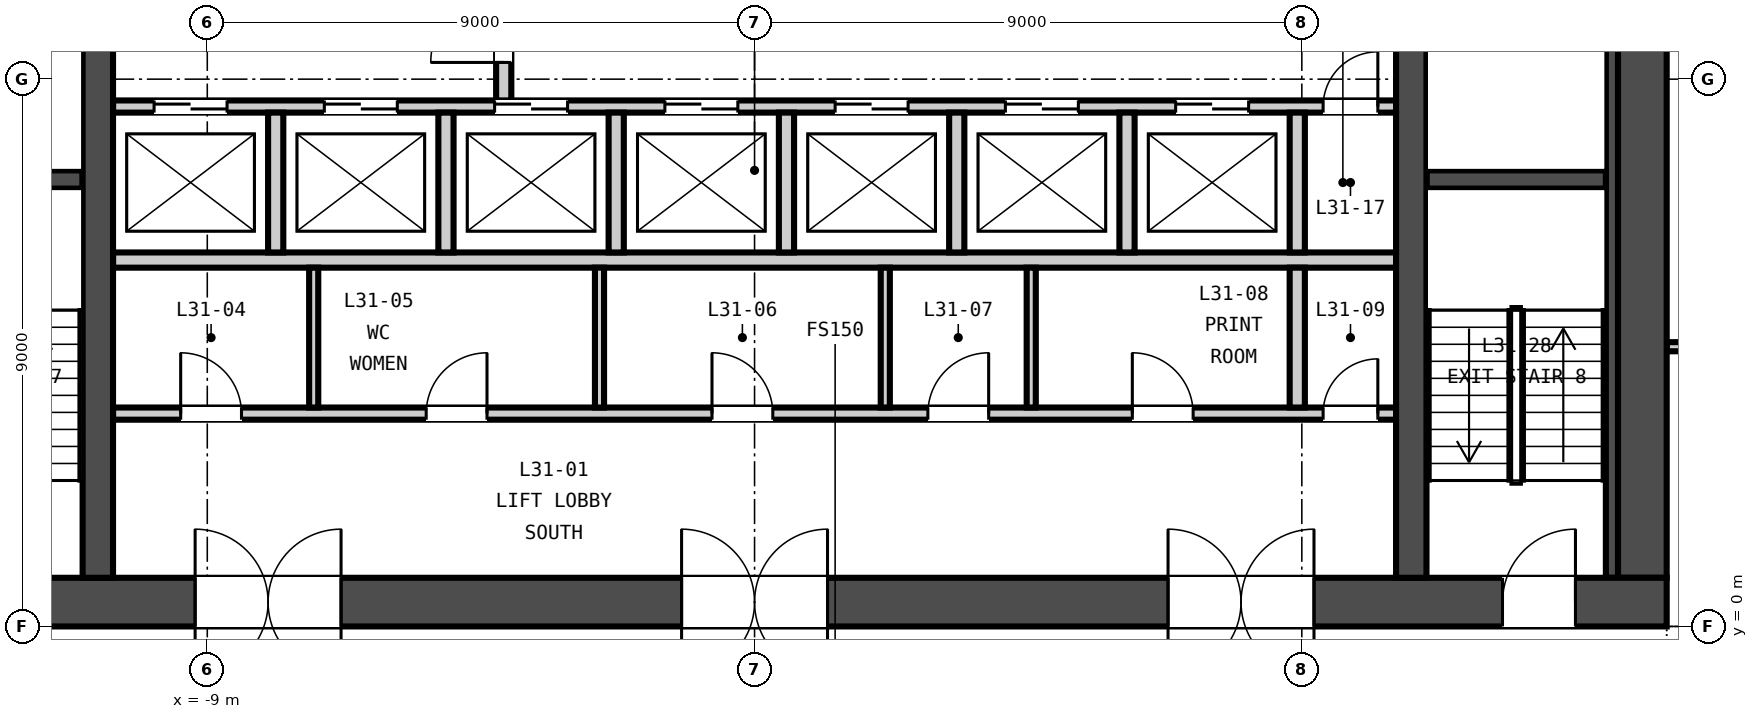
"""IFC4 building model, lengths in metres.
Left out: names, types, materials, properties, quantities, classifications, styles, units other than length and angle.
Written with IfcOpenShell. Run it as: python <this file> out.ifc"""

import sys

from ifc_helpers import new_model, si_unit, direction, frame, frame_2d, origin, place, context, subcontext, project, spatial, rectangle, extrude, element, fill, save


model = new_model("IFC4")
c1 = context("Model", 3, precision=1e-05, world=origin(), true_north=direction((0.0, 1.0)))
c2 = subcontext(c1, "Body", "Model", "MODEL_VIEW")
j1 = project(units=[si_unit("LENGTHUNIT", "METRE"), si_unit("PLANEANGLEUNIT", "RADIAN")], contexts=[c1])
p1 = place(None, origin())
s1 = spatial("IfcSite", under=j1, at=p1, CompositionType="ELEMENT")
p2 = place(p1, origin())
s2 = spatial("IfcBuilding", under=s1, at=p2, CompositionType="ELEMENT")
p3 = place(p2, frame((0.0, 0.0, 129.8)))
s3 = spatial("IfcBuildingStorey", under=s2, at=p3, CompositionType="ELEMENT", Elevation=129.8)
p4 = place(p3, frame((-15.0, 0.4, -0.15), z_axis=(0.0, 0.0, 1.0), x_axis=(1.0, 0.0, 0.0)))
e1 = element("IfcWall", 1, at=p4, inside=s3, PredefinedType="SOLIDWALL", context=c2, shape_type="SweptSolid", body=[
    extrude(rectangle(XDim=30.0, YDim=0.8, at=frame_2d((15.0, 0.0))), origin(), (0.0, 0.0, 1.0), 3.65),
])
p5 = place(p4, frame((5.8, 0.0, 0.15)))
e2 = element("IfcOpeningElement", 2, at=p5, cuts=e1, PredefinedType="OPENING", context=c2, shape_type="SweptSolid", body=[
    extrude(rectangle(XDim=2.4, YDim=2.4, at=frame_2d((1.2, 1.2))), frame((0.0, 0.41, 0.0), z_axis=(0.0, -1.0, 0.0), x_axis=(1.0, 0.0, 0.0)), (0.0, 0.0, 1.0), 0.82),
])
p6 = place(p4, frame((13.8, 0.0, 0.15)))
e3 = element("IfcOpeningElement", 3, at=p6, cuts=e1, PredefinedType="OPENING", context=c2, shape_type="SweptSolid", body=[
    extrude(rectangle(XDim=2.4, YDim=2.4, at=frame_2d((1.2, 1.2))), frame((0.0, 0.41, 0.0), z_axis=(0.0, -1.0, 0.0), x_axis=(1.0, 0.0, 0.0)), (0.0, 0.0, 1.0), 0.82),
])
p7 = place(p4, frame((21.8, 0.0, 0.15)))
e4 = element("IfcOpeningElement", 4, at=p7, cuts=e1, PredefinedType="OPENING", context=c2, shape_type="SweptSolid", body=[
    extrude(rectangle(XDim=2.4, YDim=2.4, at=frame_2d((1.2, 1.2))), frame((0.0, 0.41, 0.0), z_axis=(0.0, -1.0, 0.0), x_axis=(1.0, 0.0, 0.0)), (0.0, 0.0, 1.0), 0.82),
])
p8 = place(p4, frame((1.5, 0.0, 0.15)))
e5 = element("IfcOpeningElement", 5, at=p8, cuts=e1, PredefinedType="OPENING", context=c2, shape_type="SweptSolid", body=[
    extrude(rectangle(XDim=1.2, YDim=2.1, at=frame_2d((0.6, 1.05))), frame((0.0, 0.41, 0.0), z_axis=(0.0, -1.0, 0.0), x_axis=(1.0, 0.0, 0.0)), (0.0, 0.0, 1.0), 0.82),
])
p9 = place(p4, frame((27.3, 0.0, 0.15)))
e6 = element("IfcOpeningElement", 6, at=p9, cuts=e1, PredefinedType="OPENING", context=c2, shape_type="SweptSolid", body=[
    extrude(rectangle(XDim=1.2, YDim=2.1, at=frame_2d((0.6, 1.05))), frame((0.0, 0.41, 0.0), z_axis=(0.0, -1.0, 0.0), x_axis=(1.0, 0.0, 0.0)), (0.0, 0.0, 1.0), 0.82),
])
p10 = place(p3, frame((14.6, 0.8, -0.15), z_axis=(0.0, 0.0, 1.0), x_axis=(0.0, 1.0, 0.0)))
e7 = element("IfcWall", 7, at=p10, inside=s3, PredefinedType="SOLIDWALL", context=c2, shape_type="SweptSolid", body=[
    extrude(rectangle(XDim=13.4, YDim=0.8, at=frame_2d((6.7, 0.0))), origin(), (0.0, 0.0, 1.0), 3.65),
])
for number, where, z_axis, x_axis in (
    (8, (-10.8, 0.8, -0.15), (0.0, 0.0, 1.0), (0.0, 1.0, 0.0)),
    (9, (10.8, 0.8, -0.15), (0.0, 0.0, 1.0), (0.0, 1.0, 0.0)),
):
    element("IfcWall", number, at=place(p3, frame(where, z_axis=z_axis, x_axis=x_axis)), inside=s3, PredefinedType="SOLIDWALL", context=c2, shape_type="SweptSolid", body=[
        extrude(rectangle(XDim=13.4, YDim=0.5, at=frame_2d((6.7, 0.0))), origin(), (0.0, 0.0, 1.0), 3.65),
    ])
p11 = place(p3, frame((-10.55, 3.5, 0.0), z_axis=(0.0, 0.0, 1.0), x_axis=(1.0, 0.0, 0.0)))
e10 = element("IfcWall", 10, at=p11, inside=s3, PredefinedType="PARTITIONING", context=c2, shape_type="SweptSolid", body=[
    extrude(rectangle(XDim=21.1, YDim=0.2, at=frame_2d((10.55, 0.0))), origin(), (0.0, 0.0, 1.0), 3.5),
])
p12 = place(p11, frame((1.113, 0.0, 0.0)))
e11 = element("IfcOpeningElement", 11, at=p12, cuts=e10, PredefinedType="OPENING", context=c2, shape_type="SweptSolid", body=[
    extrude(rectangle(XDim=1.0, YDim=2.1, at=frame_2d((0.5, 1.05))), frame((0.0, 0.11, 0.0), z_axis=(0.0, -1.0, 0.0), x_axis=(1.0, 0.0, 0.0)), (0.0, 0.0, 1.0), 0.22),
])
p13 = place(p11, frame((5.15, 0.0, 0.0)))
e12 = element("IfcOpeningElement", 12, at=p13, cuts=e10, PredefinedType="OPENING", context=c2, shape_type="SweptSolid", body=[
    extrude(rectangle(XDim=1.0, YDim=2.1, at=frame_2d((0.5, 1.05))), frame((0.0, 0.11, 0.0), z_axis=(0.0, -1.0, 0.0), x_axis=(1.0, 0.0, 0.0)), (0.0, 0.0, 1.0), 0.22),
])
p14 = place(p11, frame((9.85, 0.0, 0.0)))
e13 = element("IfcOpeningElement", 13, at=p14, cuts=e10, PredefinedType="OPENING", context=c2, shape_type="SweptSolid", body=[
    extrude(rectangle(XDim=1.0, YDim=2.1, at=frame_2d((0.5, 1.05))), frame((0.0, 0.11, 0.0), z_axis=(0.0, -1.0, 0.0), x_axis=(1.0, 0.0, 0.0)), (0.0, 0.0, 1.0), 0.22),
])
p15 = place(p11, frame((13.4, 0.0, 0.0)))
e14 = element("IfcOpeningElement", 14, at=p15, cuts=e10, PredefinedType="OPENING", context=c2, shape_type="SweptSolid", body=[
    extrude(rectangle(XDim=1.0, YDim=2.1, at=frame_2d((0.5, 1.05))), frame((0.0, 0.11, 0.0), z_axis=(0.0, -1.0, 0.0), x_axis=(1.0, 0.0, 0.0)), (0.0, 0.0, 1.0), 0.22),
])
p16 = place(p11, frame((16.762, 0.0, 0.0)))
e15 = element("IfcOpeningElement", 15, at=p16, cuts=e10, PredefinedType="OPENING", context=c2, shape_type="SweptSolid", body=[
    extrude(rectangle(XDim=1.0, YDim=2.1, at=frame_2d((0.5, 1.05))), frame((0.0, 0.11, 0.0), z_axis=(0.0, -1.0, 0.0), x_axis=(1.0, 0.0, 0.0)), (0.0, 0.0, 1.0), 0.22),
])
p17 = place(p11, frame((19.9, 0.0, 0.0)))
e16 = element("IfcOpeningElement", 16, at=p17, cuts=e10, PredefinedType="OPENING", context=c2, shape_type="SweptSolid", body=[
    extrude(rectangle(XDim=0.9, YDim=2.1, at=frame_2d((0.45, 1.05))), frame((0.0, 0.11, 0.0), z_axis=(0.0, -1.0, 0.0), x_axis=(1.0, 0.0, 0.0)), (0.0, 0.0, 1.0), 0.22),
])
p18 = place(p3, frame((-10.55, 6.025, 0.0), z_axis=(0.0, 0.0, 1.0), x_axis=(1.0, 0.0, 0.0)))
e17 = element("IfcWall", 17, at=p18, inside=s3, PredefinedType="PARTITIONING", context=c2, shape_type="SweptSolid", body=[
    extrude(rectangle(XDim=21.1, YDim=0.25, at=frame_2d((10.55, 0.0))), origin(), (0.0, 0.0, 1.0), 3.5),
])
p19 = place(p3, frame((-10.55, 8.55, 0.0), z_axis=(0.0, 0.0, 1.0), x_axis=(1.0, 0.0, 0.0)))
e18 = element("IfcWall", 18, at=p19, inside=s3, PredefinedType="PARTITIONING", context=c2, shape_type="SweptSolid", body=[
    extrude(rectangle(XDim=21.1, YDim=0.2, at=frame_2d((10.55, 0.0))), origin(), (0.0, 0.0, 1.0), 3.5),
])
p20 = place(p19, frame((0.675, 0.0, 0.0)))
e19 = element("IfcOpeningElement", 19, at=p20, cuts=e18, PredefinedType="OPENING", context=c2, shape_type="SweptSolid", body=[
    extrude(rectangle(XDim=1.2, YDim=2.1, at=frame_2d((0.6, 1.05))), frame((0.0, 0.11, 0.0), z_axis=(0.0, -1.0, 0.0), x_axis=(1.0, 0.0, 0.0)), (0.0, 0.0, 1.0), 0.22),
])
p21 = place(p19, frame((3.475, 0.0, 0.0)))
e20 = element("IfcOpeningElement", 20, at=p21, cuts=e18, PredefinedType="OPENING", context=c2, shape_type="SweptSolid", body=[
    extrude(rectangle(XDim=1.2, YDim=2.1, at=frame_2d((0.6, 1.05))), frame((0.0, 0.11, 0.0), z_axis=(0.0, -1.0, 0.0), x_axis=(1.0, 0.0, 0.0)), (0.0, 0.0, 1.0), 0.22),
])
p22 = place(p19, frame((6.275, 0.0, 0.0)))
e21 = element("IfcOpeningElement", 21, at=p22, cuts=e18, PredefinedType="OPENING", context=c2, shape_type="SweptSolid", body=[
    extrude(rectangle(XDim=1.2, YDim=2.1, at=frame_2d((0.6, 1.05))), frame((0.0, 0.11, 0.0), z_axis=(0.0, -1.0, 0.0), x_axis=(1.0, 0.0, 0.0)), (0.0, 0.0, 1.0), 0.22),
])
p23 = place(p19, frame((9.075, 0.0, 0.0)))
e22 = element("IfcOpeningElement", 22, at=p23, cuts=e18, PredefinedType="OPENING", context=c2, shape_type="SweptSolid", body=[
    extrude(rectangle(XDim=1.2, YDim=2.1, at=frame_2d((0.6, 1.05))), frame((0.0, 0.11, 0.0), z_axis=(0.0, -1.0, 0.0), x_axis=(1.0, 0.0, 0.0)), (0.0, 0.0, 1.0), 0.22),
])
p24 = place(p19, frame((11.875, 0.0, 0.0)))
e23 = element("IfcOpeningElement", 23, at=p24, cuts=e18, PredefinedType="OPENING", context=c2, shape_type="SweptSolid", body=[
    extrude(rectangle(XDim=1.2, YDim=2.1, at=frame_2d((0.6, 1.05))), frame((0.0, 0.11, 0.0), z_axis=(0.0, -1.0, 0.0), x_axis=(1.0, 0.0, 0.0)), (0.0, 0.0, 1.0), 0.22),
])
p25 = place(p19, frame((14.675, 0.0, 0.0)))
e24 = element("IfcOpeningElement", 24, at=p25, cuts=e18, PredefinedType="OPENING", context=c2, shape_type="SweptSolid", body=[
    extrude(rectangle(XDim=1.2, YDim=2.1, at=frame_2d((0.6, 1.05))), frame((0.0, 0.11, 0.0), z_axis=(0.0, -1.0, 0.0), x_axis=(1.0, 0.0, 0.0)), (0.0, 0.0, 1.0), 0.22),
])
p26 = place(p19, frame((17.475, 0.0, 0.0)))
e25 = element("IfcOpeningElement", 25, at=p26, cuts=e18, PredefinedType="OPENING", context=c2, shape_type="SweptSolid", body=[
    extrude(rectangle(XDim=1.2, YDim=2.1, at=frame_2d((0.6, 1.05))), frame((0.0, 0.11, 0.0), z_axis=(0.0, -1.0, 0.0), x_axis=(1.0, 0.0, 0.0)), (0.0, 0.0, 1.0), 0.22),
])
p27 = place(p19, frame((19.9, 0.0, 0.0)))
e26 = element("IfcOpeningElement", 26, at=p27, cuts=e18, PredefinedType="OPENING", context=c2, shape_type="SweptSolid", body=[
    extrude(rectangle(XDim=0.9, YDim=2.1, at=frame_2d((0.45, 1.05))), frame((0.0, 0.11, 0.0), z_axis=(0.0, -1.0, 0.0), x_axis=(1.0, 0.0, 0.0)), (0.0, 0.0, 1.0), 0.22),
])
p28 = place(p3, frame((-4.125, 8.65, 0.0), z_axis=(0.0, 0.0, 1.0), x_axis=(0.0, 1.0, 0.0)))
e27 = element("IfcWall", 27, at=p28, inside=s3, PredefinedType="PARTITIONING", context=c2, shape_type="SweptSolid", body=[
    extrude(rectangle(XDim=2.45, YDim=0.25, at=frame_2d((1.225, 0.0))), origin(), (0.0, 0.0, 1.0), 3.5),
])
p29 = place(p28, frame((0.625, 0.0, 0.0)))
e28 = element("IfcOpeningElement", 28, at=p29, cuts=e27, PredefinedType="OPENING", context=c2, shape_type="SweptSolid", body=[
    extrude(rectangle(XDim=1.2, YDim=2.1, at=frame_2d((0.6, 1.05))), frame((0.0, 0.135, 0.0), z_axis=(0.0, -1.0, 0.0), x_axis=(1.0, 0.0, 0.0)), (0.0, 0.0, 1.0), 0.27),
])
for number, where, z_axis, x_axis in (
    (29, (-7.25, 3.6, 0.0), (0.0, 0.0, 1.0), (0.0, 1.0, 0.0)),
    (30, (-2.55, 3.6, 0.0), (0.0, 0.0, 1.0), (0.0, 1.0, 0.0)),
    (31, (2.15, 3.6, 0.0), (0.0, 0.0, 1.0), (0.0, 1.0, 0.0)),
    (32, (4.55, 3.6, 0.0), (0.0, 0.0, 1.0), (0.0, 1.0, 0.0)),
):
    element("IfcWall", number, at=place(p3, frame(where, z_axis=z_axis, x_axis=x_axis)), inside=s3, PredefinedType="PARTITIONING", context=c2, shape_type="SweptSolid", body=[
        extrude(rectangle(XDim=2.3, YDim=0.15, at=frame_2d((1.15, 0.0))), origin(), (0.0, 0.0, 1.0), 3.5),
    ])
p30 = place(p3, frame((8.925, 3.6, 0.0), z_axis=(0.0, 0.0, 1.0), x_axis=(0.0, 1.0, 0.0)))
e33 = element("IfcWall", 33, at=p30, inside=s3, PredefinedType="PARTITIONING", context=c2, shape_type="SweptSolid", body=[
    extrude(rectangle(XDim=2.3, YDim=0.25, at=frame_2d((1.15, 0.0))), origin(), (0.0, 0.0, 1.0), 3.5),
])
for number, where, z_axis, x_axis in (
    (34, (-7.875, 6.15, 0.0), (0.0, 0.0, 1.0), (0.0, 1.0, 0.0)),
    (35, (-5.075, 6.15, 0.0), (0.0, 0.0, 1.0), (0.0, 1.0, 0.0)),
    (36, (-2.275, 6.15, 0.0), (0.0, 0.0, 1.0), (0.0, 1.0, 0.0)),
    (37, (0.525, 6.15, 0.0), (0.0, 0.0, 1.0), (0.0, 1.0, 0.0)),
    (38, (3.325, 6.15, 0.0), (0.0, 0.0, 1.0), (0.0, 1.0, 0.0)),
    (39, (6.125, 6.15, 0.0), (0.0, 0.0, 1.0), (0.0, 1.0, 0.0)),
    (40, (8.925, 6.15, 0.0), (0.0, 0.0, 1.0), (0.0, 1.0, 0.0)),
):
    element("IfcWall", number, at=place(p3, frame(where, z_axis=z_axis, x_axis=x_axis)), inside=s3, PredefinedType="PARTITIONING", context=c2, shape_type="SweptSolid", body=[
        extrude(rectangle(XDim=2.3, YDim=0.25, at=frame_2d((1.15, 0.0))), origin(), (0.0, 0.0, 1.0), 3.5),
    ])
for number, where, z_axis, x_axis in (
    (41, (-14.0, 7.35, 0.0), (0.0, 0.0, 1.0), (1.0, 0.0, 0.0)),
    (42, (11.05, 7.35, 0.0), (0.0, 0.0, 1.0), (1.0, 0.0, 0.0)),
):
    element("IfcWall", number, at=place(p3, frame(where, z_axis=z_axis, x_axis=x_axis)), inside=s3, PredefinedType="SOLIDWALL", context=c2, shape_type="SweptSolid", body=[
        extrude(rectangle(XDim=2.95, YDim=0.3, at=frame_2d((1.475, 0.0))), origin(), (0.0, 0.0, 1.0), 3.5),
    ])
p31 = place(p3, frame((14.1, 0.8, 0.0), z_axis=(0.0, 0.0, 1.0), x_axis=(0.0, 1.0, 0.0)))
e43 = element("IfcWall", 43, at=p31, inside=s3, PredefinedType="SOLIDWALL", context=c2, shape_type="SweptSolid", body=[
    extrude(rectangle(XDim=13.4, YDim=0.2, at=frame_2d((6.7, 0.0))), origin(), (0.0, 0.0, 1.0), 3.5),
])
p32 = place(p3, frame((15.0, 4.6, 0.0), z_axis=(0.0, 0.0, 1.0), x_axis=(1.0, 0.0, 0.0)))
e44 = element("IfcWall", 44, at=p32, inside=s3, PredefinedType="PARTITIONING", context=c2, shape_type="SweptSolid", body=[
    extrude(rectangle(XDim=4.5, YDim=0.15, at=frame_2d((2.25, 0.0))), origin(), (0.0, 0.0, 1.0), 2.741),
])
p33 = place(p29, origin())
e45 = element("IfcDoor", 45, at=p33, inside=s3, OperationType="SINGLE_SWING_LEFT", PredefinedType="DOOR", context=c2, shape_type="SweptSolid", body=[
    extrude(rectangle(XDim=1.2, YDim=2.1, at=frame_2d((0.6, 1.05))), frame((0.0, 0.025, 0.0), z_axis=(0.0, -1.0, 0.0), x_axis=(1.0, 0.0, 0.0)), (0.0, 0.0, 1.0), 0.05),
])
fill(e28, e45)
p34 = place(p12, origin())
e46 = element("IfcDoor", 46, at=p34, inside=s3, OperationType="SINGLE_SWING_LEFT", PredefinedType="DOOR", context=c2, shape_type="SweptSolid", body=[
    extrude(rectangle(XDim=1.0, YDim=2.1, at=frame_2d((0.5, 1.05))), frame((0.0, 0.025, 0.0), z_axis=(0.0, -1.0, 0.0), x_axis=(1.0, 0.0, 0.0)), (0.0, 0.0, 1.0), 0.05),
])
fill(e11, e46)
p35 = place(p13, origin())
e47 = element("IfcDoor", 47, at=p35, inside=s3, OperationType="SINGLE_SWING_RIGHT", PredefinedType="DOOR", context=c2, shape_type="SweptSolid", body=[
    extrude(rectangle(XDim=1.0, YDim=2.1, at=frame_2d((0.5, 1.05))), frame((0.0, 0.025, 0.0), z_axis=(0.0, -1.0, 0.0), x_axis=(1.0, 0.0, 0.0)), (0.0, 0.0, 1.0), 0.05),
])
fill(e12, e47)
p36 = place(p14, origin())
e48 = element("IfcDoor", 48, at=p36, inside=s3, OperationType="SINGLE_SWING_LEFT", PredefinedType="DOOR", context=c2, shape_type="SweptSolid", body=[
    extrude(rectangle(XDim=1.0, YDim=2.1, at=frame_2d((0.5, 1.05))), frame((0.0, 0.025, 0.0), z_axis=(0.0, -1.0, 0.0), x_axis=(1.0, 0.0, 0.0)), (0.0, 0.0, 1.0), 0.05),
])
fill(e13, e48)
p37 = place(p15, origin())
e49 = element("IfcDoor", 49, at=p37, inside=s3, OperationType="SINGLE_SWING_RIGHT", PredefinedType="DOOR", context=c2, shape_type="SweptSolid", body=[
    extrude(rectangle(XDim=1.0, YDim=2.1, at=frame_2d((0.5, 1.05))), frame((0.0, 0.025, 0.0), z_axis=(0.0, -1.0, 0.0), x_axis=(1.0, 0.0, 0.0)), (0.0, 0.0, 1.0), 0.05),
])
fill(e14, e49)
p38 = place(p16, origin())
e50 = element("IfcDoor", 50, at=p38, inside=s3, OperationType="SINGLE_SWING_LEFT", PredefinedType="DOOR", context=c2, shape_type="SweptSolid", body=[
    extrude(rectangle(XDim=1.0, YDim=2.1, at=frame_2d((0.5, 1.05))), frame((0.0, 0.025, 0.0), z_axis=(0.0, -1.0, 0.0), x_axis=(1.0, 0.0, 0.0)), (0.0, 0.0, 1.0), 0.05),
])
fill(e15, e50)
p39 = place(p17, origin())
e51 = element("IfcDoor", 51, at=p39, inside=s3, OperationType="SINGLE_SWING_RIGHT", PredefinedType="DOOR", context=c2, shape_type="SweptSolid", body=[
    extrude(rectangle(XDim=0.9, YDim=2.1, at=frame_2d((0.45, 1.05))), frame((0.0, 0.025, 0.0), z_axis=(0.0, -1.0, 0.0), x_axis=(1.0, 0.0, 0.0)), (0.0, 0.0, 1.0), 0.05),
])
fill(e16, e51)
p40 = place(p20, origin())
e52 = element("IfcDoor", 52, at=p40, inside=s3, OperationType="DOUBLE_DOOR_SLIDING", PredefinedType="DOOR", context=c2, shape_type="SweptSolid", body=[
    extrude(rectangle(XDim=1.2, YDim=2.1, at=frame_2d((0.6, 1.05))), frame((0.0, 0.025, 0.0), z_axis=(0.0, -1.0, 0.0), x_axis=(1.0, 0.0, 0.0)), (0.0, 0.0, 1.0), 0.05),
])
fill(e19, e52)
p41 = place(p21, origin())
e53 = element("IfcDoor", 53, at=p41, inside=s3, OperationType="DOUBLE_DOOR_SLIDING", PredefinedType="DOOR", context=c2, shape_type="SweptSolid", body=[
    extrude(rectangle(XDim=1.2, YDim=2.1, at=frame_2d((0.6, 1.05))), frame((0.0, 0.025, 0.0), z_axis=(0.0, -1.0, 0.0), x_axis=(1.0, 0.0, 0.0)), (0.0, 0.0, 1.0), 0.05),
])
fill(e20, e53)
p42 = place(p22, origin())
e54 = element("IfcDoor", 54, at=p42, inside=s3, OperationType="DOUBLE_DOOR_SLIDING", PredefinedType="DOOR", context=c2, shape_type="SweptSolid", body=[
    extrude(rectangle(XDim=1.2, YDim=2.1, at=frame_2d((0.6, 1.05))), frame((0.0, 0.025, 0.0), z_axis=(0.0, -1.0, 0.0), x_axis=(1.0, 0.0, 0.0)), (0.0, 0.0, 1.0), 0.05),
])
fill(e21, e54)
p43 = place(p23, origin())
e55 = element("IfcDoor", 55, at=p43, inside=s3, OperationType="DOUBLE_DOOR_SLIDING", PredefinedType="DOOR", context=c2, shape_type="SweptSolid", body=[
    extrude(rectangle(XDim=1.2, YDim=2.1, at=frame_2d((0.6, 1.05))), frame((0.0, 0.025, 0.0), z_axis=(0.0, -1.0, 0.0), x_axis=(1.0, 0.0, 0.0)), (0.0, 0.0, 1.0), 0.05),
])
fill(e22, e55)
p44 = place(p24, origin())
e56 = element("IfcDoor", 56, at=p44, inside=s3, OperationType="DOUBLE_DOOR_SLIDING", PredefinedType="DOOR", context=c2, shape_type="SweptSolid", body=[
    extrude(rectangle(XDim=1.2, YDim=2.1, at=frame_2d((0.6, 1.05))), frame((0.0, 0.025, 0.0), z_axis=(0.0, -1.0, 0.0), x_axis=(1.0, 0.0, 0.0)), (0.0, 0.0, 1.0), 0.05),
])
fill(e23, e56)
p45 = place(p25, origin())
e57 = element("IfcDoor", 57, at=p45, inside=s3, OperationType="DOUBLE_DOOR_SLIDING", PredefinedType="DOOR", context=c2, shape_type="SweptSolid", body=[
    extrude(rectangle(XDim=1.2, YDim=2.1, at=frame_2d((0.6, 1.05))), frame((0.0, 0.025, 0.0), z_axis=(0.0, -1.0, 0.0), x_axis=(1.0, 0.0, 0.0)), (0.0, 0.0, 1.0), 0.05),
])
fill(e24, e57)
p46 = place(p26, origin())
e58 = element("IfcDoor", 58, at=p46, inside=s3, OperationType="DOUBLE_DOOR_SLIDING", PredefinedType="DOOR", context=c2, shape_type="SweptSolid", body=[
    extrude(rectangle(XDim=1.2, YDim=2.1, at=frame_2d((0.6, 1.05))), frame((0.0, 0.025, 0.0), z_axis=(0.0, -1.0, 0.0), x_axis=(1.0, 0.0, 0.0)), (0.0, 0.0, 1.0), 0.05),
])
fill(e25, e58)
p47 = place(p27, origin())
e59 = element("IfcDoor", 59, at=p47, inside=s3, OperationType="SINGLE_SWING_RIGHT", PredefinedType="DOOR", context=c2, shape_type="SweptSolid", body=[
    extrude(rectangle(XDim=0.9, YDim=2.1, at=frame_2d((0.45, 1.05))), frame((0.0, 0.025, 0.0), z_axis=(0.0, -1.0, 0.0), x_axis=(1.0, 0.0, 0.0)), (0.0, 0.0, 1.0), 0.05),
])
fill(e26, e59)
p48 = place(p5, origin())
e60 = element("IfcDoor", 60, at=p48, inside=s3, OperationType="DOUBLE_DOOR_DOUBLE_SWING", PredefinedType="DOOR", context=c2, shape_type="SweptSolid", body=[
    extrude(rectangle(XDim=2.4, YDim=2.4, at=frame_2d((1.2, 1.2))), frame((0.0, 0.025, 0.0), z_axis=(0.0, -1.0, 0.0), x_axis=(1.0, 0.0, 0.0)), (0.0, 0.0, 1.0), 0.05),
])
fill(e2, e60)
p49 = place(p6, origin())
e61 = element("IfcDoor", 61, at=p49, inside=s3, OperationType="DOUBLE_DOOR_DOUBLE_SWING", PredefinedType="DOOR", context=c2, shape_type="SweptSolid", body=[
    extrude(rectangle(XDim=2.4, YDim=2.4, at=frame_2d((1.2, 1.2))), frame((0.0, 0.025, 0.0), z_axis=(0.0, -1.0, 0.0), x_axis=(1.0, 0.0, 0.0)), (0.0, 0.0, 1.0), 0.05),
])
fill(e3, e61)
p50 = place(p7, origin())
e62 = element("IfcDoor", 62, at=p50, inside=s3, OperationType="DOUBLE_DOOR_DOUBLE_SWING", PredefinedType="DOOR", context=c2, shape_type="SweptSolid", body=[
    extrude(rectangle(XDim=2.4, YDim=2.4, at=frame_2d((1.2, 1.2))), frame((0.0, 0.025, 0.0), z_axis=(0.0, -1.0, 0.0), x_axis=(1.0, 0.0, 0.0)), (0.0, 0.0, 1.0), 0.05),
])
fill(e4, e62)
p51 = place(p9, origin())
e63 = element("IfcDoor", 63, at=p51, inside=s3, OperationType="SINGLE_SWING_RIGHT", PredefinedType="DOOR", context=c2, shape_type="SweptSolid", body=[
    extrude(rectangle(XDim=1.2, YDim=2.1, at=frame_2d((0.6, 1.05))), frame((0.0, 0.025, 0.0), z_axis=(0.0, -1.0, 0.0), x_axis=(1.0, 0.0, 0.0)), (0.0, 0.0, 1.0), 0.05),
])
fill(e6, e63)
save(model, sys.argv[1])
